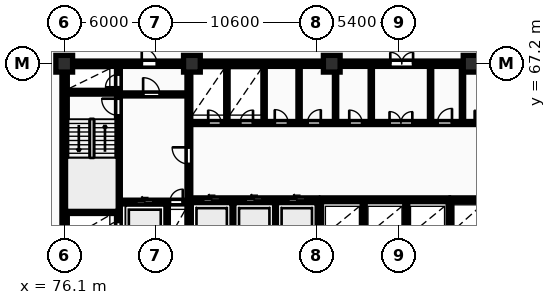
"""IFC4 building model, lengths in metres.
Left out: names, types, materials, properties, quantities, classifications, styles, units other than length and angle.
Written with IfcOpenShell. Run it as: python <this file> out.ifc"""

import sys

from ifc_helpers import new_model, si_unit, direction, frame, frame_2d, origin, origin_2d, place, context, subcontext, project, spatial, rectangle, extrude, element, fill, save


model = new_model("IFC4")
c1 = context("Model", 3, precision=1e-05, world=origin(), true_north=direction((0.0, 1.0)))
c2 = subcontext(c1, "Body", "Model", "MODEL_VIEW")
j1 = project(units=[si_unit("LENGTHUNIT", "METRE"), si_unit("PLANEANGLEUNIT", "RADIAN")], contexts=[c1])
p1 = place(None, origin())
s1 = spatial("IfcSite", under=j1, at=p1, CompositionType="ELEMENT")
p2 = place(p1, origin())
s2 = spatial("IfcBuilding", under=s1, at=p2, CompositionType="ELEMENT")
p3 = place(p2, frame((0.0, 0.0, -7.2)))
s3 = spatial("IfcBuildingStorey", under=s2, at=p3, CompositionType="ELEMENT", Elevation=-7.2)
for number, where, z_axis, x_axis in (
    (1, (76.1, 67.2, 0.0), (0.0, 0.0, 1.0), (1.0, 0.0, 0.0)),
    (2, (84.5, 67.2, 0.0), (0.0, 0.0, 1.0), (1.0, 0.0, 0.0)),
    (3, (93.7, 67.2, 0.0), (0.0, 0.0, 1.0), (1.0, 0.0, 0.0)),
    (4, (102.9, 67.2, 0.0), (0.0, 0.0, 1.0), (1.0, 0.0, 0.0)),
):
    element("IfcColumn", number, at=place(p3, frame(where, z_axis=z_axis, x_axis=x_axis)), inside=s3, PredefinedType="COLUMN", context=c2, shape_type="SweptSolid", body=[
        extrude(rectangle(XDim=1.1, YDim=1.1, at=origin_2d()), origin(), (0.0, 0.0, 1.0), 3.6),
    ])
p4 = place(p3, frame((76.125, 55.375, 0.0), z_axis=(0.0, 0.0, 1.0), x_axis=(0.0, 1.0, 0.0)))
e5 = element("IfcWall", 5, at=p4, inside=s3, PredefinedType="SHEAR", context=c2, shape_type="SweptSolid", body=[
    extrude(rectangle(XDim=11.65, YDim=0.35, at=frame_2d((5.825, 0.0))), origin(), (0.0, 0.0, 1.0), 3.6),
])
p5 = place(p3, frame((75.95, 67.2, 0.0), z_axis=(0.0, 0.0, 1.0), x_axis=(1.0, 0.0, 0.0)))
e6 = element("IfcWall", 6, at=p5, inside=s3, PredefinedType="SHEAR", context=c2, shape_type="SweptSolid", body=[
    extrude(rectangle(XDim=36.3, YDim=0.35, at=frame_2d((18.15, 0.0))), origin(), (0.0, 0.0, 1.0), 3.6),
])
p6 = place(p5, frame((5.25, 0.0, 0.0)))
e7 = element("IfcOpeningElement", 7, at=p6, cuts=e6, PredefinedType="OPENING", context=c2, shape_type="SweptSolid", body=[
    extrude(rectangle(XDim=1.0, YDim=2.15, at=frame_2d((0.5, 1.075))), frame((0.0, 0.185, 0.0), z_axis=(0.0, -1.0, 0.0), x_axis=(1.0, 0.0, 0.0)), (0.0, 0.0, 1.0), 0.37),
])
p7 = place(p5, frame((21.6, 0.0, 0.0)))
e8 = element("IfcOpeningElement", 8, at=p7, cuts=e6, PredefinedType="OPENING", context=c2, shape_type="SweptSolid", body=[
    extrude(rectangle(XDim=1.5, YDim=2.2, at=frame_2d((0.75, 1.1))), frame((0.0, 0.185, 0.0), z_axis=(0.0, -1.0, 0.0), x_axis=(1.0, 0.0, 0.0)), (0.0, 0.0, 1.0), 0.37),
])
p8 = place(p5, frame((30.45, 0.0, 0.0)))
e9 = element("IfcOpeningElement", 9, at=p8, cuts=e6, PredefinedType="OPENING", context=c2, shape_type="SweptSolid", body=[
    extrude(rectangle(XDim=1.0, YDim=2.15, at=frame_2d((0.5, 1.075))), frame((0.0, 0.185, 0.0), z_axis=(0.0, -1.0, 0.0), x_axis=(1.0, 0.0, 0.0)), (0.0, 0.0, 1.0), 0.37),
])
p9 = place(p3, frame((79.665, 55.4, 0.0), z_axis=(0.0, 0.0, 1.0), x_axis=(0.0, 1.0, 0.0)))
e10 = element("IfcWall", 10, at=p9, inside=s3, PredefinedType="SHEAR", context=c2, shape_type="SweptSolid", body=[
    extrude(rectangle(XDim=11.6, YDim=0.25, at=frame_2d((5.8, 0.0))), origin(), (0.0, 0.0, 1.0), 3.6),
])
p10 = place(p9, frame((0.55, 0.0, 0.0)))
e11 = element("IfcOpeningElement", 11, at=p10, cuts=e10, PredefinedType="OPENING", context=c2, shape_type="SweptSolid", body=[
    extrude(rectangle(XDim=0.85, YDim=2.05, at=frame_2d((0.425, 1.025))), frame((0.0, 0.135, 0.0), z_axis=(0.0, -1.0, 0.0), x_axis=(1.0, 0.0, 0.0)), (0.0, 0.0, 1.0), 0.27),
])
p11 = place(p9, frame((8.4, 0.0, 0.0)))
e12 = element("IfcOpeningElement", 12, at=p11, cuts=e10, PredefinedType="OPENING", context=c2, shape_type="SweptSolid", body=[
    extrude(rectangle(XDim=1.1, YDim=2.1, at=frame_2d((0.55, 1.05))), frame((0.0, 0.135, 0.0), z_axis=(0.0, -1.0, 0.0), x_axis=(1.0, 0.0, 0.0)), (0.0, 0.0, 1.0), 0.27),
])
p12 = place(p9, frame((10.25, 0.0, 0.0)))
e13 = element("IfcOpeningElement", 13, at=p12, cuts=e10, PredefinedType="OPENING", context=c2, shape_type="SweptSolid", body=[
    extrude(rectangle(XDim=0.85, YDim=2.05, at=frame_2d((0.425, 1.025))), frame((0.0, 0.135, 0.0), z_axis=(0.0, -1.0, 0.0), x_axis=(1.0, 0.0, 0.0)), (0.0, 0.0, 1.0), 0.27),
])
for number, where, z_axis, x_axis in (
    (14, (76.3, 57.475, 0.0), (0.0, 0.0, 1.0), (1.0, 0.0, 0.0)),
    (15, (76.3, 65.325, 0.0), (0.0, 0.0, 1.0), (1.0, 0.0, 0.0)),
):
    element("IfcWall", number, at=place(p3, frame(where, z_axis=z_axis, x_axis=x_axis)), inside=s3, PredefinedType="SHEAR", context=c2, shape_type="SweptSolid", body=[
        extrude(rectangle(XDim=3.24, YDim=0.25, at=frame_2d((1.62, 0.0))), origin(), (0.0, 0.0, 1.0), 3.6),
    ])
p13 = place(p3, frame((79.79, 58.1, 0.0), z_axis=(0.0, 0.0, 1.0), x_axis=(1.0, 0.0, 0.0)))
e16 = element("IfcWall", 16, at=p13, inside=s3, PredefinedType="SHEAR", context=c2, shape_type="SweptSolid", body=[
    extrude(rectangle(XDim=4.39, YDim=0.25, at=frame_2d((2.195, 0.0))), origin(), (0.0, 0.0, 1.0), 3.6),
])
p14 = place(p13, frame((1.05, 0.0, 0.0)))
e17 = element("IfcOpeningElement", 17, at=p14, cuts=e16, PredefinedType="OPENING", context=c2, shape_type="SweptSolid", body=[
    extrude(rectangle(XDim=1.12, YDim=2.12, at=frame_2d((0.56, 1.06))), frame((0.0, 0.135, 0.0), z_axis=(0.0, -1.0, 0.0), x_axis=(1.0, 0.0, 0.0)), (0.0, 0.0, 1.0), 0.27),
])
p15 = place(p13, frame((3.26, 0.0, 0.0)))
e18 = element("IfcOpeningElement", 18, at=p15, cuts=e16, PredefinedType="OPENING", context=c2, shape_type="SweptSolid", body=[
    extrude(rectangle(XDim=0.85, YDim=2.05, at=frame_2d((0.425, 1.025))), frame((0.0, 0.135, 0.0), z_axis=(0.0, -1.0, 0.0), x_axis=(1.0, 0.0, 0.0)), (0.0, 0.0, 1.0), 0.27),
])
p16 = place(p3, frame((82.85, 55.4, 0.0), z_axis=(0.0, 0.0, 1.0), x_axis=(0.0, 1.0, 0.0)))
e19 = element("IfcWall", 19, at=p16, inside=s3, PredefinedType="PARTITIONING", context=c2, shape_type="SweptSolid", body=[
    extrude(rectangle(XDim=2.56, YDim=0.2, at=frame_2d((1.28, 0.0))), origin(), (0.0, 0.0, 1.0), 3.3),
])
p17 = place(p3, frame((79.79, 65.18, 0.0), z_axis=(0.0, 0.0, 1.0), x_axis=(1.0, 0.0, 0.0)))
e20 = element("IfcWall", 20, at=p17, inside=s3, PredefinedType="PARTITIONING", context=c2, shape_type="SweptSolid", body=[
    extrude(rectangle(XDim=4.39, YDim=0.2, at=frame_2d((2.195, 0.0))), origin(), (0.0, 0.0, 1.0), 3.3),
])
p18 = place(p17, frame((1.5, 0.0, 0.0)))
e21 = element("IfcOpeningElement", 21, at=p18, cuts=e20, PredefinedType="OPENING", context=c2, shape_type="SweptSolid", body=[
    extrude(rectangle(XDim=1.1, YDim=2.1, at=frame_2d((0.55, 1.05))), frame((0.0, 0.11, 0.0), z_axis=(0.0, -1.0, 0.0), x_axis=(1.0, 0.0, 0.0)), (0.0, 0.0, 1.0), 0.22),
])
p19 = place(p3, frame((84.3, 55.4, 0.0), z_axis=(0.0, 0.0, 1.0), x_axis=(0.0, 1.0, 0.0)))
e22 = element("IfcWall", 22, at=p19, inside=s3, PredefinedType="SHEAR", context=c2, shape_type="SweptSolid", body=[
    extrude(rectangle(XDim=11.6, YDim=0.25, at=frame_2d((5.8, 0.0))), origin(), (0.0, 0.0, 1.0), 3.6),
])
p20 = place(p19, frame((5.2, 0.0, 0.0)))
e23 = element("IfcOpeningElement", 23, at=p20, cuts=e22, PredefinedType="OPENING", context=c2, shape_type="SweptSolid", body=[
    extrude(rectangle(XDim=1.1, YDim=2.1, at=frame_2d((0.55, 1.05))), frame((0.0, 0.135, 0.0), z_axis=(0.0, -1.0, 0.0), x_axis=(1.0, 0.0, 0.0)), (0.0, 0.0, 1.0), 0.27),
])
for number, where, z_axis, x_axis in (
    (24, (87.2, 55.4, 0.0), (0.0, 0.0, 1.0), (0.0, 1.0, 0.0)),
    (25, (90.0, 55.4, 0.0), (0.0, 0.0, 1.0), (0.0, 1.0, 0.0)),
):
    element("IfcWall", number, at=place(p3, frame(where, z_axis=z_axis, x_axis=x_axis)), inside=s3, PredefinedType="PARTITIONING", context=c2, shape_type="SweptSolid", body=[
        extrude(rectangle(XDim=2.72, YDim=0.2, at=frame_2d((1.36, 0.0))), origin(), (0.0, 0.0, 1.0), 3.3),
    ])
p21 = place(p3, frame((84.42, 58.25, 0.0), z_axis=(0.0, 0.0, 1.0), x_axis=(1.0, 0.0, 0.0)))
e26 = element("IfcWall", 26, at=p21, inside=s3, PredefinedType="SHEAR", context=c2, shape_type="SweptSolid", body=[
    extrude(rectangle(XDim=8.36, YDim=0.25, at=frame_2d((4.18, 0.0))), origin(), (0.0, 0.0, 1.0), 3.6),
])
p22 = place(p21, frame((0.82, 0.0, 0.0)))
e27 = element("IfcOpeningElement", 27, at=p22, cuts=e26, PredefinedType="OPENING", context=c2, shape_type="SweptSolid", body=[
    extrude(rectangle(XDim=1.12, YDim=2.12, at=frame_2d((0.56, 1.06))), frame((0.0, 0.135, 0.0), z_axis=(0.0, -1.0, 0.0), x_axis=(1.0, 0.0, 0.0)), (0.0, 0.0, 1.0), 0.27),
])
p23 = place(p21, frame((3.62, 0.0, 0.0)))
e28 = element("IfcOpeningElement", 28, at=p23, cuts=e26, PredefinedType="OPENING", context=c2, shape_type="SweptSolid", body=[
    extrude(rectangle(XDim=1.12, YDim=2.12, at=frame_2d((0.56, 1.06))), frame((0.0, 0.135, 0.0), z_axis=(0.0, -1.0, 0.0), x_axis=(1.0, 0.0, 0.0)), (0.0, 0.0, 1.0), 0.27),
])
p24 = place(p21, frame((6.42, 0.0, 0.0)))
e29 = element("IfcOpeningElement", 29, at=p24, cuts=e26, PredefinedType="OPENING", context=c2, shape_type="SweptSolid", body=[
    extrude(rectangle(XDim=1.12, YDim=2.12, at=frame_2d((0.56, 1.06))), frame((0.0, 0.135, 0.0), z_axis=(0.0, -1.0, 0.0), x_axis=(1.0, 0.0, 0.0)), (0.0, 0.0, 1.0), 0.27),
])
p25 = place(p3, frame((92.9, 55.4, 0.0), z_axis=(0.0, 0.0, 1.0), x_axis=(0.0, 1.0, 0.0)))
e30 = element("IfcWall", 30, at=p25, inside=s3, PredefinedType="SHEAR", context=c2, shape_type="SweptSolid", body=[
    extrude(rectangle(XDim=2.85, YDim=0.25, at=frame_2d((1.425, 0.0))), origin(), (0.0, 0.0, 1.0), 3.6),
])
for number, where, z_axis, x_axis in (
    (31, (95.8, 55.4, 0.0), (0.0, 0.0, 1.0), (0.0, 1.0, 0.0)),
    (32, (98.6, 55.4, 0.0), (0.0, 0.0, 1.0), (0.0, 1.0, 0.0)),
):
    element("IfcWall", number, at=place(p3, frame(where, z_axis=z_axis, x_axis=x_axis)), inside=s3, PredefinedType="PARTITIONING", context=c2, shape_type="SweptSolid", body=[
        extrude(rectangle(XDim=2.72, YDim=0.2, at=frame_2d((1.36, 0.0))), origin(), (0.0, 0.0, 1.0), 3.3),
    ])
p26 = place(p3, frame((93.02, 58.25, 0.0), z_axis=(0.0, 0.0, 1.0), x_axis=(1.0, 0.0, 0.0)))
e33 = element("IfcWall", 33, at=p26, inside=s3, PredefinedType="SHEAR", context=c2, shape_type="SweptSolid", body=[
    extrude(rectangle(XDim=8.36, YDim=0.25, at=frame_2d((4.18, 0.0))), origin(), (0.0, 0.0, 1.0), 3.6),
])
p27 = place(p3, frame((101.48, 55.4, 0.0), z_axis=(0.0, 0.0, 1.0), x_axis=(0.0, 1.0, 0.0)))
e34 = element("IfcWall", 34, at=p27, inside=s3, PredefinedType="SHEAR", context=c2, shape_type="SweptSolid", body=[
    extrude(rectangle(XDim=2.85, YDim=0.25, at=frame_2d((1.425, 0.0))), origin(), (0.0, 0.0, 1.0), 3.6),
])
p28 = place(p3, frame((101.55, 58.25, 0.0), z_axis=(0.0, 0.0, 1.0), x_axis=(1.0, 0.0, 0.0)))
e35 = element("IfcWall", 35, at=p28, inside=s3, PredefinedType="SHEAR", context=c2, shape_type="SweptSolid", body=[
    extrude(rectangle(XDim=4.6, YDim=0.25, at=frame_2d((2.3, 0.0))), origin(), (0.0, 0.0, 1.0), 3.6),
])
for number, where, z_axis, x_axis in (
    (36, (86.8, 63.4, 0.0), (0.0, 0.0, 1.0), (0.0, 1.0, 0.0)),
    (37, (89.25, 63.4, 0.0), (0.0, 0.0, 1.0), (0.0, 1.0, 0.0)),
    (38, (91.55, 63.4, 0.0), (0.0, 0.0, 1.0), (0.0, 1.0, 0.0)),
):
    element("IfcWall", number, at=place(p3, frame(where, z_axis=z_axis, x_axis=x_axis)), inside=s3, PredefinedType="PARTITIONING", context=c2, shape_type="SweptSolid", body=[
        extrude(rectangle(XDim=3.6, YDim=0.15, at=frame_2d((1.8, 0.0))), origin(), (0.0, 0.0, 1.0), 3.3),
    ])
p29 = place(p3, frame((93.95, 63.4, 0.0), z_axis=(0.0, 0.0, 1.0), x_axis=(0.0, 1.0, 0.0)))
e39 = element("IfcWall", 39, at=p29, inside=s3, PredefinedType="PARTITIONING", context=c2, shape_type="SweptSolid", body=[
    extrude(rectangle(XDim=3.6, YDim=0.15, at=frame_2d((1.8, 0.0))), origin(), (0.0, 0.0, 1.0), 2.55),
])
for number, where, z_axis, x_axis in (
    (40, (102.3, 63.4, 0.0), (0.0, 0.0, 1.0), (0.0, 1.0, 0.0)),
    (41, (96.3, 63.4, 0.0), (0.0, 0.0, 1.0), (0.0, 1.0, 0.0)),
    (42, (100.2, 63.4, 0.0), (0.0, 0.0, 1.0), (0.0, 1.0, 0.0)),
):
    element("IfcWall", number, at=place(p3, frame(where, z_axis=z_axis, x_axis=x_axis)), inside=s3, PredefinedType="PARTITIONING", context=c2, shape_type="SweptSolid", body=[
        extrude(rectangle(XDim=3.6, YDim=0.15, at=frame_2d((1.8, 0.0))), origin(), (0.0, 0.0, 1.0), 3.3),
    ])
p30 = place(p3, frame((84.42, 63.3, 0.0), z_axis=(0.0, 0.0, 1.0), x_axis=(1.0, 0.0, 0.0)))
e43 = element("IfcWall", 43, at=p30, inside=s3, PredefinedType="PARTITIONING", context=c2, shape_type="SweptSolid", body=[
    extrude(rectangle(XDim=19.83, YDim=0.2, at=frame_2d((9.915, 0.0))), origin(), (0.0, 0.0, 1.0), 3.3),
])
p31 = place(p30, frame((1.15, 0.0, 0.0)))
e44 = element("IfcOpeningElement", 44, at=p31, cuts=e43, PredefinedType="OPENING", context=c2, shape_type="SweptSolid", body=[
    extrude(rectangle(XDim=0.85, YDim=2.05, at=frame_2d((0.425, 1.025))), frame((0.0, 0.11, 0.0), z_axis=(0.0, -1.0, 0.0), x_axis=(1.0, 0.0, 0.0)), (0.0, 0.0, 1.0), 0.22),
])
p32 = place(p30, frame((3.25, 0.0, 0.0)))
e45 = element("IfcOpeningElement", 45, at=p32, cuts=e43, PredefinedType="OPENING", context=c2, shape_type="SweptSolid", body=[
    extrude(rectangle(XDim=0.85, YDim=2.05, at=frame_2d((0.425, 1.025))), frame((0.0, 0.11, 0.0), z_axis=(0.0, -1.0, 0.0), x_axis=(1.0, 0.0, 0.0)), (0.0, 0.0, 1.0), 0.22),
])
p33 = place(p30, frame((13.08, 0.0, 0.0)))
e46 = element("IfcOpeningElement", 46, at=p33, cuts=e43, PredefinedType="OPENING", context=c2, shape_type="SweptSolid", body=[
    extrude(rectangle(XDim=1.5, YDim=2.2, at=frame_2d((0.75, 1.1))), frame((0.0, 0.11, 0.0), z_axis=(0.0, -1.0, 0.0), x_axis=(1.0, 0.0, 0.0)), (0.0, 0.0, 1.0), 0.22),
])
p34 = place(p30, frame((5.53, 0.0, 0.0)))
e47 = element("IfcOpeningElement", 47, at=p34, cuts=e43, PredefinedType="OPENING", context=c2, shape_type="SweptSolid", body=[
    extrude(rectangle(XDim=0.88, YDim=2.06, at=frame_2d((0.44, 1.03))), frame((0.0, 0.11, 0.0), z_axis=(0.0, -1.0, 0.0), x_axis=(1.0, 0.0, 0.0)), (0.0, 0.0, 1.0), 0.22),
])
p35 = place(p30, frame((7.68, 0.0, 0.0)))
e48 = element("IfcOpeningElement", 48, at=p35, cuts=e43, PredefinedType="OPENING", context=c2, shape_type="SweptSolid", body=[
    extrude(rectangle(XDim=0.88, YDim=2.06, at=frame_2d((0.44, 1.03))), frame((0.0, 0.11, 0.0), z_axis=(0.0, -1.0, 0.0), x_axis=(1.0, 0.0, 0.0)), (0.0, 0.0, 1.0), 0.22),
])
p36 = place(p30, frame((10.43, 0.0, 0.0)))
e49 = element("IfcOpeningElement", 49, at=p36, cuts=e43, PredefinedType="OPENING", context=c2, shape_type="SweptSolid", body=[
    extrude(rectangle(XDim=0.85, YDim=2.05, at=frame_2d((0.425, 1.025))), frame((0.0, 0.11, 0.0), z_axis=(0.0, -1.0, 0.0), x_axis=(1.0, 0.0, 0.0)), (0.0, 0.0, 1.0), 0.22),
])
p37 = place(p30, frame((16.23, 0.0, 0.0)))
e50 = element("IfcOpeningElement", 50, at=p37, cuts=e43, PredefinedType="OPENING", context=c2, shape_type="SweptSolid", body=[
    extrude(rectangle(XDim=0.96, YDim=2.1, at=frame_2d((0.48, 1.05))), frame((0.0, 0.11, 0.0), z_axis=(0.0, -1.0, 0.0), x_axis=(1.0, 0.0, 0.0)), (0.0, 0.0, 1.0), 0.22),
])
p38 = place(p30, frame((18.68, 0.0, 0.0)))
e51 = element("IfcOpeningElement", 51, at=p38, cuts=e43, PredefinedType="OPENING", context=c2, shape_type="SweptSolid", body=[
    extrude(rectangle(XDim=0.84, YDim=2.04, at=frame_2d((0.42, 1.02))), frame((0.0, 0.11, 0.0), z_axis=(0.0, -1.0, 0.0), x_axis=(1.0, 0.0, 0.0)), (0.0, 0.0, 1.0), 0.22),
])
p39 = place(p6, origin())
e52 = element("IfcDoor", 52, at=p39, inside=s3, OperationType="SINGLE_SWING_LEFT", PredefinedType="DOOR", context=c2, shape_type="SweptSolid", body=[
    extrude(rectangle(XDim=1.0, YDim=2.15, at=frame_2d((0.5, 1.075))), frame((0.0, 0.025, 0.0), z_axis=(0.0, -1.0, 0.0), x_axis=(1.0, 0.0, 0.0)), (0.0, 0.0, 1.0), 0.05),
])
fill(e7, e52)
p40 = place(p7, origin())
e53 = element("IfcDoor", 53, at=p40, inside=s3, OperationType="DOUBLE_DOOR_SINGLE_SWING", PredefinedType="DOOR", context=c2, shape_type="SweptSolid", body=[
    extrude(rectangle(XDim=1.5, YDim=2.2, at=frame_2d((0.75, 1.1))), frame((0.0, 0.025, 0.0), z_axis=(0.0, -1.0, 0.0), x_axis=(1.0, 0.0, 0.0)), (0.0, 0.0, 1.0), 0.05),
])
fill(e8, e53)
p41 = place(p10, origin())
e54 = element("IfcDoor", 54, at=p41, inside=s3, OperationType="SINGLE_SWING_LEFT", PredefinedType="DOOR", context=c2, shape_type="SweptSolid", body=[
    extrude(rectangle(XDim=0.85, YDim=2.05, at=frame_2d((0.425, 1.025))), frame((0.0, 0.025, 0.0), z_axis=(0.0, -1.0, 0.0), x_axis=(1.0, 0.0, 0.0)), (0.0, 0.0, 1.0), 0.05),
])
fill(e11, e54)
p42 = place(p11, origin())
e55 = element("IfcDoor", 55, at=p42, inside=s3, OperationType="SINGLE_SWING_RIGHT", PredefinedType="DOOR", context=c2, shape_type="SweptSolid", body=[
    extrude(rectangle(XDim=1.1, YDim=2.1, at=frame_2d((0.55, 1.05))), frame((0.0, 0.025, 0.0), z_axis=(0.0, -1.0, 0.0), x_axis=(1.0, 0.0, 0.0)), (0.0, 0.0, 1.0), 0.05),
])
fill(e12, e55)
p43 = place(p12, origin())
e56 = element("IfcDoor", 56, at=p43, inside=s3, OperationType="SINGLE_SWING_LEFT", PredefinedType="DOOR", context=c2, shape_type="SweptSolid", body=[
    extrude(rectangle(XDim=0.85, YDim=2.05, at=frame_2d((0.425, 1.025))), frame((0.0, 0.025, 0.0), z_axis=(0.0, -1.0, 0.0), x_axis=(1.0, 0.0, 0.0)), (0.0, 0.0, 1.0), 0.05),
])
fill(e13, e56)
p44 = place(p14, origin())
e57 = element("IfcDoor", 57, at=p44, inside=s3, OperationType="SLIDING_TO_LEFT", PredefinedType="DOOR", context=c2, shape_type="SweptSolid", body=[
    extrude(rectangle(XDim=1.12, YDim=2.12, at=frame_2d((0.56, 1.06))), frame((0.0, 0.025, 0.0), z_axis=(0.0, -1.0, 0.0), x_axis=(1.0, 0.0, 0.0)), (0.0, 0.0, 1.0), 0.05),
])
fill(e17, e57)
p45 = place(p15, origin())
e58 = element("IfcDoor", 58, at=p45, inside=s3, OperationType="SINGLE_SWING_RIGHT", PredefinedType="DOOR", context=c2, shape_type="SweptSolid", body=[
    extrude(rectangle(XDim=0.85, YDim=2.05, at=frame_2d((0.425, 1.025))), frame((0.0, 0.025, 0.0), z_axis=(0.0, -1.0, 0.0), x_axis=(1.0, 0.0, 0.0)), (0.0, 0.0, 1.0), 0.05),
])
fill(e18, e58)
p46 = place(p18, origin())
e59 = element("IfcDoor", 59, at=p46, inside=s3, OperationType="SINGLE_SWING_LEFT", PredefinedType="DOOR", context=c2, shape_type="SweptSolid", body=[
    extrude(rectangle(XDim=1.1, YDim=2.1, at=frame_2d((0.55, 1.05))), frame((0.0, 0.025, 0.0), z_axis=(0.0, -1.0, 0.0), x_axis=(1.0, 0.0, 0.0)), (0.0, 0.0, 1.0), 0.05),
])
fill(e21, e59)
p47 = place(p20, origin())
e60 = element("IfcDoor", 60, at=p47, inside=s3, OperationType="SINGLE_SWING_RIGHT", PredefinedType="DOOR", context=c2, shape_type="SweptSolid", body=[
    extrude(rectangle(XDim=1.1, YDim=2.1, at=frame_2d((0.55, 1.05))), frame((0.0, 0.025, 0.0), z_axis=(0.0, -1.0, 0.0), x_axis=(1.0, 0.0, 0.0)), (0.0, 0.0, 1.0), 0.05),
])
fill(e23, e60)
p48 = place(p22, origin())
e61 = element("IfcDoor", 61, at=p48, inside=s3, OperationType="SLIDING_TO_LEFT", PredefinedType="DOOR", context=c2, shape_type="SweptSolid", body=[
    extrude(rectangle(XDim=1.12, YDim=2.12, at=frame_2d((0.56, 1.06))), frame((0.0, 0.025, 0.0), z_axis=(0.0, -1.0, 0.0), x_axis=(1.0, 0.0, 0.0)), (0.0, 0.0, 1.0), 0.05),
])
fill(e27, e61)
p49 = place(p23, origin())
e62 = element("IfcDoor", 62, at=p49, inside=s3, OperationType="SLIDING_TO_LEFT", PredefinedType="DOOR", context=c2, shape_type="SweptSolid", body=[
    extrude(rectangle(XDim=1.12, YDim=2.12, at=frame_2d((0.56, 1.06))), frame((0.0, 0.025, 0.0), z_axis=(0.0, -1.0, 0.0), x_axis=(1.0, 0.0, 0.0)), (0.0, 0.0, 1.0), 0.05),
])
fill(e28, e62)
p50 = place(p24, origin())
e63 = element("IfcDoor", 63, at=p50, inside=s3, OperationType="SLIDING_TO_LEFT", PredefinedType="DOOR", context=c2, shape_type="SweptSolid", body=[
    extrude(rectangle(XDim=1.12, YDim=2.12, at=frame_2d((0.56, 1.06))), frame((0.0, 0.025, 0.0), z_axis=(0.0, -1.0, 0.0), x_axis=(1.0, 0.0, 0.0)), (0.0, 0.0, 1.0), 0.05),
])
fill(e29, e63)
p51 = place(p31, origin())
e64 = element("IfcDoor", 64, at=p51, inside=s3, OperationType="SINGLE_SWING_LEFT", PredefinedType="DOOR", context=c2, shape_type="SweptSolid", body=[
    extrude(rectangle(XDim=0.85, YDim=2.05, at=frame_2d((0.425, 1.025))), frame((0.0, 0.025, 0.0), z_axis=(0.0, -1.0, 0.0), x_axis=(1.0, 0.0, 0.0)), (0.0, 0.0, 1.0), 0.05),
])
fill(e44, e64)
p52 = place(p32, origin())
e65 = element("IfcDoor", 65, at=p52, inside=s3, OperationType="SINGLE_SWING_RIGHT", PredefinedType="DOOR", context=c2, shape_type="SweptSolid", body=[
    extrude(rectangle(XDim=0.85, YDim=2.05, at=frame_2d((0.425, 1.025))), frame((0.0, 0.025, 0.0), z_axis=(0.0, -1.0, 0.0), x_axis=(1.0, 0.0, 0.0)), (0.0, 0.0, 1.0), 0.05),
])
fill(e45, e65)
p53 = place(p33, origin())
e66 = element("IfcDoor", 66, at=p53, inside=s3, OperationType="DOUBLE_DOOR_SINGLE_SWING", PredefinedType="DOOR", context=c2, shape_type="SweptSolid", body=[
    extrude(rectangle(XDim=1.5, YDim=2.2, at=frame_2d((0.75, 1.1))), frame((0.0, 0.025, 0.0), z_axis=(0.0, -1.0, 0.0), x_axis=(1.0, 0.0, 0.0)), (0.0, 0.0, 1.0), 0.05),
])
fill(e46, e66)
p54 = place(p34, origin())
e67 = element("IfcDoor", 67, at=p54, inside=s3, OperationType="SINGLE_SWING_LEFT", PredefinedType="DOOR", context=c2, shape_type="SweptSolid", body=[
    extrude(rectangle(XDim=0.88, YDim=2.06, at=frame_2d((0.44, 1.03))), frame((0.0, 0.025, 0.0), z_axis=(0.0, -1.0, 0.0), x_axis=(1.0, 0.0, 0.0)), (0.0, 0.0, 1.0), 0.05),
])
fill(e47, e67)
p55 = place(p35, origin())
e68 = element("IfcDoor", 68, at=p55, inside=s3, OperationType="SINGLE_SWING_RIGHT", PredefinedType="DOOR", context=c2, shape_type="SweptSolid", body=[
    extrude(rectangle(XDim=0.88, YDim=2.06, at=frame_2d((0.44, 1.03))), frame((0.0, 0.025, 0.0), z_axis=(0.0, -1.0, 0.0), x_axis=(1.0, 0.0, 0.0)), (0.0, 0.0, 1.0), 0.05),
])
fill(e48, e68)
p56 = place(p36, origin())
e69 = element("IfcDoor", 69, at=p56, inside=s3, OperationType="SINGLE_SWING_LEFT", PredefinedType="DOOR", context=c2, shape_type="SweptSolid", body=[
    extrude(rectangle(XDim=0.85, YDim=2.05, at=frame_2d((0.425, 1.025))), frame((0.0, 0.025, 0.0), z_axis=(0.0, -1.0, 0.0), x_axis=(1.0, 0.0, 0.0)), (0.0, 0.0, 1.0), 0.05),
])
fill(e49, e69)
p57 = place(p37, origin())
e70 = element("IfcDoor", 70, at=p57, inside=s3, OperationType="SINGLE_SWING_RIGHT", PredefinedType="DOOR", context=c2, shape_type="SweptSolid", body=[
    extrude(rectangle(XDim=0.96, YDim=2.1, at=frame_2d((0.48, 1.05))), frame((0.0, 0.025, 0.0), z_axis=(0.0, -1.0, 0.0), x_axis=(1.0, 0.0, 0.0)), (0.0, 0.0, 1.0), 0.05),
])
fill(e50, e70)
p58 = place(p38, origin())
e71 = element("IfcDoor", 71, at=p58, inside=s3, OperationType="SINGLE_SWING_LEFT", PredefinedType="DOOR", context=c2, shape_type="SweptSolid", body=[
    extrude(rectangle(XDim=0.84, YDim=2.04, at=frame_2d((0.42, 1.02))), frame((0.0, 0.025, 0.0), z_axis=(0.0, -1.0, 0.0), x_axis=(1.0, 0.0, 0.0)), (0.0, 0.0, 1.0), 0.05),
])
fill(e51, e71)
save(model, sys.argv[1])
